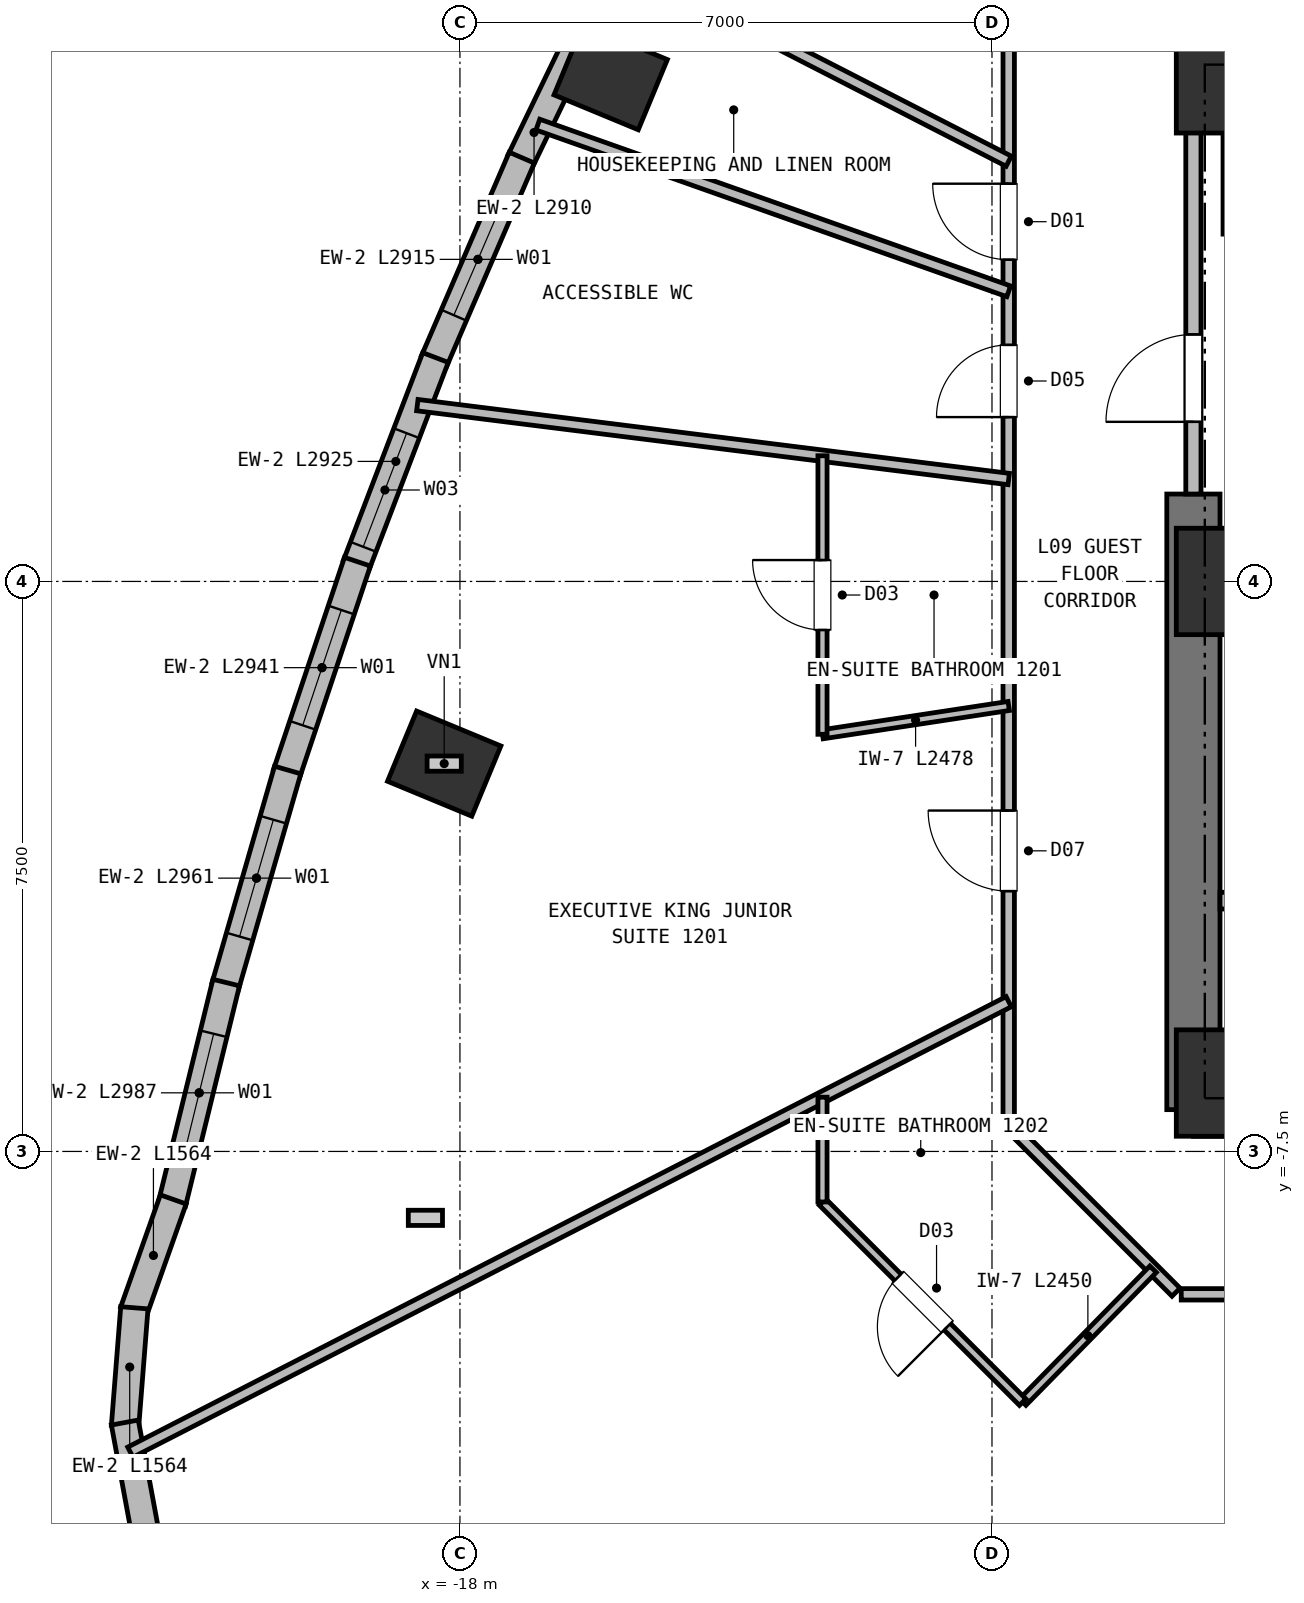
"""IFC4 building model, lengths in metres.
Left out: names, types, materials, properties, quantities, classifications, styles, units other than length and angle.
Written with IfcOpenShell. Run it as: python <this file> out.ifc"""

import sys

from ifc_helpers import new_model, si_unit, direction, frame, frame_2d, origin, origin_2d, place, context, subcontext, project, spatial, rectangle, extrude, element, fill, save


model = new_model("IFC4")
c1 = context("Model", 3, precision=1e-05, world=origin(), true_north=direction((0.0, 1.0)))
c2 = subcontext(c1, "Body", "Model", "MODEL_VIEW")
j1 = project(units=[si_unit("LENGTHUNIT", "METRE"), si_unit("PLANEANGLEUNIT", "RADIAN")], contexts=[c1])
p1 = place(None, origin())
s1 = spatial("IfcSite", under=j1, at=p1, CompositionType="ELEMENT")
p2 = place(p1, origin())
s2 = spatial("IfcBuilding", under=s1, at=p2, CompositionType="ELEMENT")
p3 = place(p2, frame((0.0, 0.0, 41.75)))
s3 = spatial("IfcBuildingStorey", under=s2, at=p3, CompositionType="ELEMENT", Elevation=41.75)
for number, where, z_axis, x_axis in (
    (1, (-8.0, -6.6, 0.0), (0.0, 0.0, 1.0), (1.0, 0.0, 0.0)),
    (2, (-8.0, 6.6, 0.0), (0.0, 0.0, 1.0), (1.0, 0.0, 0.0)),
    (3, (-8.0, 0.0, 0.0), (0.0, 0.0, 1.0), (1.0, 0.0, 0.0)),
):
    element("IfcColumn", number, at=place(p3, frame(where, z_axis=z_axis, x_axis=x_axis)), inside=s3, PredefinedType="COLUMN", context=c2, shape_type="SweptSolid", body=[
        extrude(rectangle(XDim=1.15, YDim=1.4, at=origin_2d()), origin(), (0.0, 0.0, 1.0), 3.75),
    ])
p4 = place(p3, frame((-8.35, 6.95, 0.0), z_axis=(0.0, 0.0, 1.0), x_axis=(1.0, 0.0, 0.0)))
e4 = element("IfcWall", 4, at=p4, inside=s3, PredefinedType="SHEAR", context=c2, shape_type="SweptSolid", body=[
    extrude(rectangle(XDim=16.7, YDim=0.7, at=frame_2d((8.35, 0.0))), origin(), (0.0, 0.0, 1.0), 3.5),
])
p5 = place(p3, frame((-8.35, -6.95, 0.0), z_axis=(0.0, 0.0, 1.0), x_axis=(1.0, 0.0, 0.0)))
e5 = element("IfcWall", 5, at=p5, inside=s3, PredefinedType="SHEAR", context=c2, shape_type="SweptSolid", body=[
    extrude(rectangle(XDim=3.95, YDim=0.7, at=frame_2d((1.975, 0.0))), origin(), (0.0, 0.0, 1.0), 3.5),
])
p6 = place(p3, frame((-8.35, -6.95, 0.0), z_axis=(0.0, 0.0, 1.0), x_axis=(0.0, 1.0, 0.0)))
e6 = element("IfcWall", 6, at=p6, inside=s3, PredefinedType="SHEAR", context=c2, shape_type="SweptSolid", body=[
    extrude(rectangle(XDim=8.1, YDim=0.7, at=frame_2d((4.05, 0.0))), origin(), (0.0, 0.0, 1.0), 3.5),
])
for number, where, z_axis, x_axis in (
    (7, (-16.017, 6.635, 0.0), (0.0, 0.0, 1.0), (0.383, 0.924, 0.0)),
    (8, (-18.207, -2.397, 0.0), (0.0, 0.0, 1.0), (0.383, 0.924, 0.0)),
):
    element("IfcColumn", number, at=place(p3, frame(where, z_axis=z_axis, x_axis=x_axis)), inside=s3, PredefinedType="COLUMN", context=c2, shape_type="SweptSolid", body=[
        extrude(rectangle(XDim=1.0, YDim=1.2, at=origin_2d()), origin(), (0.0, 0.0, 1.0), 3.75),
    ])
p7 = place(p3, frame((-17.207, 5.531, 0.0), z_axis=(0.0, 0.0, 1.0), x_axis=(0.434819461164, 0.900517649018, 0.0)))
e9 = element("IfcWall", 9, at=p7, inside=s3, PredefinedType="SOLIDWALL", context=c2, shape_type="SweptSolid", body=[
    extrude(rectangle(XDim=2.91, YDim=0.36, at=frame_2d((1.455, 0.0))), origin(), (0.0, 0.0, 1.0), 3.5),
])
p8 = place(p3, frame((-18.341, 2.899, 0.0), z_axis=(0.0, 0.0, 1.0), x_axis=(0.396050960204, 0.918228531969, 0.0)))
e10 = element("IfcWall", 10, at=p8, inside=s3, PredefinedType="SOLIDWALL", context=c2, shape_type="SweptSolid", body=[
    extrude(rectangle(XDim=2.915, YDim=0.36, at=frame_2d((1.458, 0.0))), origin(), (0.0, 0.0, 1.0), 3.5),
])
p9 = place(p8, frame((0.657, 0.0, 0.72)))
e11 = element("IfcOpeningElement", 11, at=p9, cuts=e10, PredefinedType="OPENING", context=c2, shape_type="SweptSolid", body=[
    extrude(rectangle(XDim=1.6, YDim=1.88, at=frame_2d((0.8, 0.94))), frame((0.0, 0.19, 0.0), z_axis=(0.0, -1.0, 0.0), x_axis=(1.0, 0.0, 0.0)), (0.0, 0.0, 1.0), 0.38),
])
p10 = place(p3, frame((-19.365, 0.213, 0.0), z_axis=(0.0, 0.0, 1.0), x_axis=(0.356696268282, 0.934220408787, 0.0)))
e12 = element("IfcWall", 12, at=p10, inside=s3, PredefinedType="SOLIDWALL", context=c2, shape_type="SweptSolid", body=[
    extrude(rectangle(XDim=2.925, YDim=0.36, at=frame_2d((1.463, 0.0))), origin(), (0.0, 0.0, 1.0), 3.5),
])
p11 = place(p10, frame((0.26, 0.0, 0.72)))
e13 = element("IfcOpeningElement", 13, at=p11, cuts=e12, PredefinedType="OPENING", context=c2, shape_type="SweptSolid", body=[
    extrude(rectangle(XDim=1.6, YDim=1.88, at=frame_2d((0.8, 0.94))), frame((0.0, 0.19, 0.0), z_axis=(0.0, -1.0, 0.0), x_axis=(1.0, 0.0, 0.0)), (0.0, 0.0, 1.0), 0.38),
])
p12 = place(p3, frame((-20.281, -2.529, 0.0), z_axis=(0.0, 0.0, 1.0), x_axis=(0.317124206319, 0.948384013871, 0.0)))
e14 = element("IfcWall", 14, at=p12, inside=s3, PredefinedType="SOLIDWALL", context=c2, shape_type="SweptSolid", body=[
    extrude(rectangle(XDim=2.941, YDim=0.36, at=frame_2d((1.47, 0.0))), origin(), (0.0, 0.0, 1.0), 3.5),
])
p13 = place(p12, frame((0.67, 0.0, 0.72)))
e15 = element("IfcOpeningElement", 15, at=p13, cuts=e14, PredefinedType="OPENING", context=c2, shape_type="SweptSolid", body=[
    extrude(rectangle(XDim=1.6, YDim=1.88, at=frame_2d((0.8, 0.94))), frame((0.0, 0.19, 0.0), z_axis=(0.0, -1.0, 0.0), x_axis=(1.0, 0.0, 0.0)), (0.0, 0.0, 1.0), 0.38),
])
p14 = place(p3, frame((-21.088, -5.326, 0.0), z_axis=(0.0, 0.0, 1.0), x_axis=(0.277409452725, 0.960751786644, 0.0)))
e16 = element("IfcWall", 16, at=p14, inside=s3, PredefinedType="SOLIDWALL", context=c2, shape_type="SweptSolid", body=[
    extrude(rectangle(XDim=2.961, YDim=0.36, at=frame_2d((1.481, 0.0))), origin(), (0.0, 0.0, 1.0), 3.5),
])
p15 = place(p14, frame((0.681, 0.0, 0.72)))
e17 = element("IfcOpeningElement", 17, at=p15, cuts=e16, PredefinedType="OPENING", context=c2, shape_type="SweptSolid", body=[
    extrude(rectangle(XDim=1.6, YDim=1.88, at=frame_2d((0.8, 0.94))), frame((0.0, 0.19, 0.0), z_axis=(0.0, -1.0, 0.0), x_axis=(1.0, 0.0, 0.0)), (0.0, 0.0, 1.0), 0.38),
])
p16 = place(p3, frame((-21.786, -8.179, 0.0), z_axis=(0.0, 0.0, 1.0), x_axis=(0.237936398685, 0.971280737058, 0.0)))
e18 = element("IfcWall", 18, at=p16, inside=s3, PredefinedType="SOLIDWALL", context=c2, shape_type="SweptSolid", body=[
    extrude(rectangle(XDim=2.987, YDim=0.36, at=frame_2d((1.493, 0.0))), origin(), (0.0, 0.0, 1.0), 3.5),
])
p17 = place(p16, frame((0.694, 0.0, 0.72)))
e19 = element("IfcOpeningElement", 19, at=p17, cuts=e18, PredefinedType="OPENING", context=c2, shape_type="SweptSolid", body=[
    extrude(rectangle(XDim=1.6, YDim=1.88, at=frame_2d((0.8, 0.94))), frame((0.0, 0.19, 0.0), z_axis=(0.0, -1.0, 0.0), x_axis=(1.0, 0.0, 0.0)), (0.0, 0.0, 1.0), 0.38),
])
p18 = place(p3, frame((-22.294, -9.606, 0.0), z_axis=(0.0, 0.0, 1.0), x_axis=(0.333734446931, 0.942667130503, 0.0)))
e20 = element("IfcWall", 20, at=p18, inside=s3, PredefinedType="SOLIDWALL", context=c2, shape_type="SweptSolid", body=[
    extrude(rectangle(XDim=1.564, YDim=0.36, at=frame_2d((0.782, 0.0))), origin(), (0.0, 0.0, 1.0), 3.5),
])
p19 = place(p3, frame((-22.406, -11.117, 0.0), z_axis=(0.0, 0.0, 1.0), x_axis=(0.078510627557, 0.99691327675, 0.0)))
e21 = element("IfcWall", 21, at=p19, inside=s3, PredefinedType="SOLIDWALL", context=c2, shape_type="SweptSolid", body=[
    extrude(rectangle(XDim=1.564, YDim=0.36, at=frame_2d((0.782, 0.0))), origin(), (0.0, 0.0, 1.0), 3.5),
])
p20 = place(p3, frame((-22.124, -12.605, 0.0), z_axis=(0.0, 0.0, 1.0), x_axis=(-0.182318428527, 0.983239538779, 0.0)))
e22 = element("IfcWall", 22, at=p20, inside=s3, PredefinedType="SOLIDWALL", context=c2, shape_type="SweptSolid", body=[
    extrude(rectangle(XDim=1.564, YDim=0.36, at=frame_2d((0.782, 0.0))), origin(), (0.0, 0.0, 1.0), 3.5),
])
p21 = place(p3, frame((-8.0, -4.2, 0.0), z_axis=(0.0, 0.0, 1.0), x_axis=(1.0, 0.0, 0.0)))
e23 = element("IfcWall", 23, at=p21, inside=s3, PredefinedType="PARTITIONING", context=c2, shape_type="SweptSolid", body=[
    extrude(rectangle(XDim=0.91, YDim=0.22, at=frame_2d((0.455, 0.0))), origin(), (0.0, 0.0, 1.0), 3.5),
])
p22 = place(p3, frame((-7.85, 4.57, 0.0), z_axis=(0.0, 0.0, 1.0), x_axis=(0.0, 1.0, 0.0)))
e24 = element("IfcWall", 24, at=p22, inside=s3, PredefinedType="PARTITIONING", context=c2, shape_type="SweptSolid", body=[
    extrude(rectangle(XDim=2.03, YDim=0.22, at=frame_2d((1.015, 0.0))), origin(), (0.0, 0.0, 1.0), 3.08),
])
p23 = place(p3, frame((-8.35, 1.15, 0.0), z_axis=(0.0, 0.0, 1.0), x_axis=(0.0, 1.0, 0.0)))
e25 = element("IfcWall", 25, at=p23, inside=s3, PredefinedType="PARTITIONING", context=c2, shape_type="SweptSolid", body=[
    extrude(rectangle(XDim=5.4, YDim=0.2, at=frame_2d((2.7, 0.0))), origin(), (0.0, 0.0, 1.0), 3.5),
])
p24 = place(p23, frame((0.95, 0.0, 0.0)))
e26 = element("IfcOpeningElement", 26, at=p24, cuts=e25, PredefinedType="OPENING", context=c2, shape_type="SweptSolid", body=[
    extrude(rectangle(XDim=1.15, YDim=2.15, at=frame_2d((0.575, 1.075))), frame((0.0, 0.11, 0.0), z_axis=(0.0, -1.0, 0.0), x_axis=(1.0, 0.0, 0.0)), (0.0, 0.0, 1.0), 0.22),
])
p25 = place(p3, frame((8.51, -9.38, 0.0), z_axis=(0.0, 0.0, 1.0), x_axis=(-1.0, 0.0, 0.0)))
e27 = element("IfcWall", 27, at=p25, inside=s3, PredefinedType="PARTITIONING", context=c2, shape_type="SweptSolid", body=[
    extrude(rectangle(XDim=17.02, YDim=0.15, at=frame_2d((8.51, 0.0))), origin(), (0.0, 0.0, 1.0), 3.5),
])
p26 = place(p25, frame((7.448, 0.0, 0.0)))
e28 = element("IfcOpeningElement", 28, at=p26, cuts=e27, PredefinedType="OPENING", context=c2, shape_type="SweptSolid", body=[
    extrude(rectangle(XDim=1.0, YDim=2.15, at=frame_2d((0.5, 1.075))), frame((0.0, 0.085, 0.0), z_axis=(0.0, -1.0, 0.0), x_axis=(1.0, 0.0, 0.0)), (0.0, 0.0, 1.0), 0.17),
])
p27 = place(p25, frame((1.309, 0.0, 0.0)))
e29 = element("IfcOpeningElement", 29, at=p27, cuts=e27, PredefinedType="OPENING", context=c2, shape_type="SweptSolid", body=[
    extrude(rectangle(XDim=1.0, YDim=2.15, at=frame_2d((0.5, 1.075))), frame((0.0, 0.085, 0.0), z_axis=(0.0, -1.0, 0.0), x_axis=(1.0, 0.0, 0.0)), (0.0, 0.0, 1.0), 0.17),
])
p28 = place(p25, frame((14.164, 0.0, 0.0)))
e30 = element("IfcOpeningElement", 30, at=p28, cuts=e27, PredefinedType="OPENING", context=c2, shape_type="SweptSolid", body=[
    extrude(rectangle(XDim=1.06, YDim=2.15, at=frame_2d((0.53, 1.075))), frame((0.0, 0.085, 0.0), z_axis=(0.0, -1.0, 0.0), x_axis=(1.0, 0.0, 0.0)), (0.0, 0.0, 1.0), 0.17),
])
p29 = place(p3, frame((-10.78, -7.11, 0.0), z_axis=(0.0, 0.0, 1.0), x_axis=(0.0, 1.0, 0.0)))
e31 = element("IfcWall", 31, at=p29, inside=s3, PredefinedType="PARTITIONING", context=c2, shape_type="SweptSolid", body=[
    extrude(rectangle(XDim=14.22, YDim=0.15, at=frame_2d((7.11, 0.0))), origin(), (0.0, 0.0, 1.0), 3.12),
])
p30 = place(p29, frame((11.344, 0.0, 0.0)))
e32 = element("IfcOpeningElement", 32, at=p30, cuts=e31, PredefinedType="OPENING", context=c2, shape_type="SweptSolid", body=[
    extrude(rectangle(XDim=1.0, YDim=2.15, at=frame_2d((0.5, 1.075))), frame((0.0, 0.085, 0.0), z_axis=(0.0, -1.0, 0.0), x_axis=(1.0, 0.0, 0.0)), (0.0, 0.0, 1.0), 0.17),
])
p31 = place(p29, frame((9.272, 0.0, 0.0)))
e33 = element("IfcOpeningElement", 33, at=p31, cuts=e31, PredefinedType="OPENING", context=c2, shape_type="SweptSolid", body=[
    extrude(rectangle(XDim=0.95, YDim=2.1, at=frame_2d((0.475, 1.05))), frame((0.0, 0.085, 0.0), z_axis=(0.0, -1.0, 0.0), x_axis=(1.0, 0.0, 0.0)), (0.0, 0.0, 1.0), 0.17),
])
p32 = place(p29, frame((3.035, 0.0, 0.0)))
e34 = element("IfcOpeningElement", 34, at=p32, cuts=e31, PredefinedType="OPENING", context=c2, shape_type="SweptSolid", body=[
    extrude(rectangle(XDim=1.06, YDim=2.15, at=frame_2d((0.53, 1.075))), frame((0.0, 0.085, 0.0), z_axis=(0.0, -1.0, 0.0), x_axis=(1.0, 0.0, 0.0)), (0.0, 0.0, 1.0), 0.17),
])
p33 = place(p3, frame((-8.578, -9.352, 0.0), z_axis=(0.0, 0.0, 1.0), x_axis=(-0.707067066127, 0.707146494016, 0.0)))
e35 = element("IfcWall", 35, at=p33, inside=s3, PredefinedType="PARTITIONING", context=c2, shape_type="SweptSolid", body=[
    extrude(rectangle(XDim=3.074, YDim=0.15, at=frame_2d((1.537, 0.0))), origin(), (0.0, 0.0, 1.0), 3.5),
])
p34 = place(p3, frame((-10.78, 1.347, 0.0), z_axis=(0.0, 0.0, 1.0), x_axis=(-0.992276439596, 0.124046230988, 0.0)))
e36 = element("IfcWall", 36, at=p34, inside=s3, PredefinedType="PARTITIONING", context=c2, shape_type="SweptSolid", body=[
    extrude(rectangle(XDim=7.841, YDim=0.15, at=frame_2d((3.92, 0.0))), origin(), (0.0, 0.0, 1.0), 3.5),
])
p35 = place(p3, frame((-10.78, -1.639, 0.0), z_axis=(0.0, 0.0, 1.0), x_axis=(-0.988634440282, -0.15033942759, 0.0)))
e37 = element("IfcWall", 37, at=p35, inside=s3, PredefinedType="PARTITIONING", context=c2, shape_type="SweptSolid", body=[
    extrude(rectangle(XDim=2.478, YDim=0.12, at=frame_2d((1.239, 0.0))), origin(), (0.0, 0.0, 1.0), 3.5),
])
p36 = place(p3, frame((-13.23, -2.011, 0.0), z_axis=(0.0, 0.0, 1.0), x_axis=(0.0, 1.0, 0.0)))
e38 = element("IfcWall", 38, at=p36, inside=s3, PredefinedType="PARTITIONING", context=c2, shape_type="SweptSolid", body=[
    extrude(rectangle(XDim=3.665, YDim=0.12, at=frame_2d((1.833, 0.0))), origin(), (0.0, 0.0, 1.0), 3.12),
])
p37 = place(p36, frame((1.373, 0.0, 0.0)))
e39 = element("IfcOpeningElement", 39, at=p37, cuts=e38, PredefinedType="OPENING", context=c2, shape_type="SweptSolid", body=[
    extrude(rectangle(XDim=0.92, YDim=2.1, at=frame_2d((0.46, 1.05))), frame((0.0, 0.07, 0.0), z_axis=(0.0, -1.0, 0.0), x_axis=(1.0, 0.0, 0.0)), (0.0, 0.0, 1.0), 0.14),
])
p38 = place(p3, frame((-10.78, -5.53, 0.0), z_axis=(0.0, 0.0, 1.0), x_axis=(-0.889778319353, -0.456392969281, 0.0)))
e40 = element("IfcWall", 40, at=p38, inside=s3, PredefinedType="PARTITIONING", context=c2, shape_type="SweptSolid", body=[
    extrude(rectangle(XDim=12.988, YDim=0.15, at=frame_2d((6.494, 0.0))), origin(), (0.0, 0.0, 1.0), 3.5),
])
p39 = place(p3, frame((-10.596, -10.799, 0.0), z_axis=(0.0, 0.0, 1.0), x_axis=(0.700399102338, 0.713751425529, 0.0)))
e41 = element("IfcWall", 41, at=p39, inside=s3, PredefinedType="PARTITIONING", context=c2, shape_type="SweptSolid", body=[
    extrude(rectangle(XDim=2.45, YDim=0.12, at=frame_2d((1.225, 0.0))), origin(), (0.0, 0.0, 1.0), 3.5),
])
p40 = place(p3, frame((-10.596, -10.799, 0.0), z_axis=(0.0, 0.0, 1.0), x_axis=(-0.707074006069, 0.707139554785, 0.0)))
e42 = element("IfcWall", 42, at=p40, inside=s3, PredefinedType="PARTITIONING", context=c2, shape_type="SweptSolid", body=[
    extrude(rectangle(XDim=3.725, YDim=0.12, at=frame_2d((1.862, 0.0))), origin(), (0.0, 0.0, 1.0), 3.5),
])
p41 = place(p40, frame((1.402, 0.0, 0.0)))
e43 = element("IfcOpeningElement", 43, at=p41, cuts=e42, PredefinedType="OPENING", context=c2, shape_type="SweptSolid", body=[
    extrude(rectangle(XDim=0.92, YDim=2.1, at=frame_2d((0.46, 1.05))), frame((0.0, 0.07, 0.0), z_axis=(0.0, -1.0, 0.0), x_axis=(1.0, 0.0, 0.0)), (0.0, 0.0, 1.0), 0.14),
])
p42 = place(p3, frame((-13.23, -6.786, 0.0), z_axis=(0.0, 0.0, 1.0), x_axis=(0.0, -1.0, 0.0)))
e44 = element("IfcWall", 44, at=p42, inside=s3, PredefinedType="PARTITIONING", context=c2, shape_type="SweptSolid", body=[
    extrude(rectangle(XDim=1.379, YDim=0.12, at=frame_2d((0.689, 0.0))), origin(), (0.0, 0.0, 1.0), 3.12),
])
p43 = place(p3, frame((-10.78, 5.53, 0.0), z_axis=(0.0, 0.0, 1.0), x_axis=(-0.889781886096, 0.456386015535, 0.0)))
e45 = element("IfcWall", 45, at=p43, inside=s3, PredefinedType="PARTITIONING", context=c2, shape_type="SweptSolid", body=[
    extrude(rectangle(XDim=5.788, YDim=0.15, at=frame_2d((2.894, 0.0))), origin(), (0.0, 0.0, 1.0), 3.5),
])
p44 = place(p3, frame((-10.78, 3.817, 0.0), z_axis=(0.0, 0.0, 1.0), x_axis=(-0.942646221325, 0.333793501167, 0.0)))
e46 = element("IfcWall", 46, at=p44, inside=s3, PredefinedType="PARTITIONING", context=c2, shape_type="SweptSolid", body=[
    extrude(rectangle(XDim=6.572, YDim=0.15, at=frame_2d((3.286, 0.0))), origin(), (0.0, 0.0, 1.0), 3.5),
])
p45 = place(p9, origin())
e47 = element("IfcWindow", 47, at=p45, inside=s3, PartitioningType="SINGLE_PANEL", PredefinedType="WINDOW", context=c2, shape_type="SweptSolid", body=[
    extrude(rectangle(XDim=1.6, YDim=1.88, at=frame_2d((0.8, 0.94))), frame((0.0, 0.03, 0.0), z_axis=(0.0, -1.0, 0.0), x_axis=(1.0, 0.0, 0.0)), (0.0, 0.0, 1.0), 0.06),
])
fill(e11, e47)
p46 = place(p11, origin())
e48 = element("IfcWindow", 48, at=p46, inside=s3, PartitioningType="SINGLE_PANEL", PredefinedType="WINDOW", context=c2, shape_type="SweptSolid", body=[
    extrude(rectangle(XDim=1.6, YDim=1.88, at=frame_2d((0.8, 0.94))), frame((0.0, 0.03, 0.0), z_axis=(0.0, -1.0, 0.0), x_axis=(1.0, 0.0, 0.0)), (0.0, 0.0, 1.0), 0.06),
])
fill(e13, e48)
p47 = place(p13, origin())
e49 = element("IfcWindow", 49, at=p47, inside=s3, PartitioningType="SINGLE_PANEL", PredefinedType="WINDOW", context=c2, shape_type="SweptSolid", body=[
    extrude(rectangle(XDim=1.6, YDim=1.88, at=frame_2d((0.8, 0.94))), frame((0.0, 0.03, 0.0), z_axis=(0.0, -1.0, 0.0), x_axis=(1.0, 0.0, 0.0)), (0.0, 0.0, 1.0), 0.06),
])
fill(e15, e49)
p48 = place(p15, origin())
e50 = element("IfcWindow", 50, at=p48, inside=s3, PartitioningType="SINGLE_PANEL", PredefinedType="WINDOW", context=c2, shape_type="SweptSolid", body=[
    extrude(rectangle(XDim=1.6, YDim=1.88, at=frame_2d((0.8, 0.94))), frame((0.0, 0.03, 0.0), z_axis=(0.0, -1.0, 0.0), x_axis=(1.0, 0.0, 0.0)), (0.0, 0.0, 1.0), 0.06),
])
fill(e17, e50)
p49 = place(p17, origin())
e51 = element("IfcWindow", 51, at=p49, inside=s3, PartitioningType="SINGLE_PANEL", PredefinedType="WINDOW", context=c2, shape_type="SweptSolid", body=[
    extrude(rectangle(XDim=1.6, YDim=1.88, at=frame_2d((0.8, 0.94))), frame((0.0, 0.03, 0.0), z_axis=(0.0, -1.0, 0.0), x_axis=(1.0, 0.0, 0.0)), (0.0, 0.0, 1.0), 0.06),
])
fill(e19, e51)
p50 = place(p24, origin())
e52 = element("IfcDoor", 52, at=p50, inside=s3, OperationType="SINGLE_SWING_LEFT", PredefinedType="DOOR", context=c2, shape_type="SweptSolid", body=[
    extrude(rectangle(XDim=1.15, YDim=2.15, at=frame_2d((0.575, 1.075))), frame((0.0, 0.025, 0.0), z_axis=(0.0, -1.0, 0.0), x_axis=(1.0, 0.0, 0.0)), (0.0, 0.0, 1.0), 0.05),
])
fill(e26, e52)
p51 = place(p37, origin())
e53 = element("IfcDoor", 53, at=p51, inside=s3, OperationType="SINGLE_SWING_RIGHT", PredefinedType="DOOR", context=c2, shape_type="SweptSolid", body=[
    extrude(rectangle(XDim=0.92, YDim=2.1, at=frame_2d((0.46, 1.05))), frame((0.0, 0.025, 0.0), z_axis=(0.0, -1.0, 0.0), x_axis=(1.0, 0.0, 0.0)), (0.0, 0.0, 1.0), 0.05),
])
fill(e39, e53)
p52 = place(p41, origin())
e54 = element("IfcDoor", 54, at=p52, inside=s3, OperationType="SINGLE_SWING_LEFT", PredefinedType="DOOR", context=c2, shape_type="SweptSolid", body=[
    extrude(rectangle(XDim=0.92, YDim=2.1, at=frame_2d((0.46, 1.05))), frame((0.0, 0.025, 0.0), z_axis=(0.0, -1.0, 0.0), x_axis=(1.0, 0.0, 0.0)), (0.0, 0.0, 1.0), 0.05),
])
fill(e43, e54)
p53 = place(p30, origin())
e55 = element("IfcDoor", 55, at=p53, inside=s3, OperationType="SINGLE_SWING_RIGHT", PredefinedType="DOOR", context=c2, shape_type="SweptSolid", body=[
    extrude(rectangle(XDim=1.0, YDim=2.15, at=frame_2d((0.5, 1.075))), frame((0.0, 0.025, 0.0), z_axis=(0.0, -1.0, 0.0), x_axis=(1.0, 0.0, 0.0)), (0.0, 0.0, 1.0), 0.05),
])
fill(e32, e55)
p54 = place(p31, origin())
e56 = element("IfcDoor", 56, at=p54, inside=s3, OperationType="SINGLE_SWING_LEFT", PredefinedType="DOOR", context=c2, shape_type="SweptSolid", body=[
    extrude(rectangle(XDim=0.95, YDim=2.1, at=frame_2d((0.475, 1.05))), frame((0.0, 0.025, 0.0), z_axis=(0.0, -1.0, 0.0), x_axis=(1.0, 0.0, 0.0)), (0.0, 0.0, 1.0), 0.05),
])
fill(e33, e56)
p55 = place(p32, origin())
e57 = element("IfcDoor", 57, at=p55, inside=s3, OperationType="SINGLE_SWING_RIGHT", PredefinedType="DOOR", context=c2, shape_type="SweptSolid", body=[
    extrude(rectangle(XDim=1.06, YDim=2.15, at=frame_2d((0.53, 1.075))), frame((0.0, 0.025, 0.0), z_axis=(0.0, -1.0, 0.0), x_axis=(1.0, 0.0, 0.0)), (0.0, 0.0, 1.0), 0.05),
])
fill(e34, e57)
save(model, sys.argv[1])
